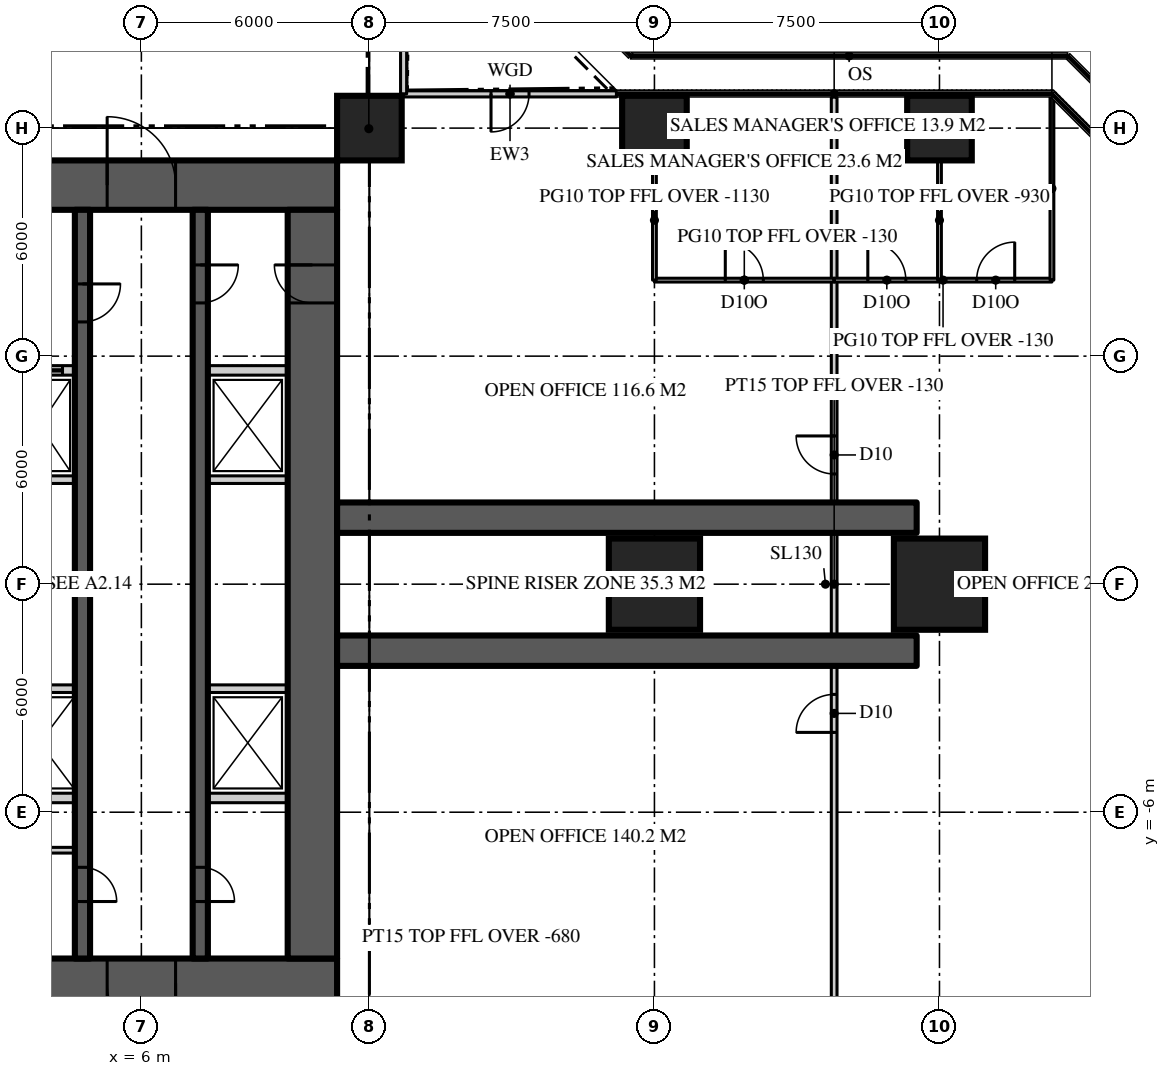
"""IFC4 building model, lengths in metres.
Left out: names, types, materials, properties, quantities, classifications, styles, units other than length and angle.
Written with IfcOpenShell. Run it as: python <this file> out.ifc"""

import sys

from ifc_helpers import new_model, si_unit, direction, frame, frame_2d, origin, origin_2d, place, context, subcontext, project, spatial, rectangle, extrude, element, fill, save


model = new_model("IFC4")
c1 = context("Model", 3, precision=1e-05, world=origin(), true_north=direction((0.0, 1.0)))
c2 = subcontext(c1, "Body", "Model", "MODEL_VIEW")
j1 = project(units=[si_unit("LENGTHUNIT", "METRE"), si_unit("PLANEANGLEUNIT", "RADIAN")], contexts=[c1])
p1 = place(None, origin())
s1 = spatial("IfcSite", under=j1, at=p1, CompositionType="ELEMENT")
p2 = place(p1, origin())
s2 = spatial("IfcBuilding", under=s1, at=p2, CompositionType="ELEMENT")
p3 = place(p2, frame((0.0, 0.0, 94.2)))
s3 = spatial("IfcBuildingStorey", under=s2, at=p3, CompositionType="ELEMENT", Elevation=94.2)
p4 = place(p3, frame((-11.15, 10.5, 0.0), z_axis=(0.0, 0.0, 1.0), x_axis=(1.0, 0.0, 0.0)))
e1 = element("IfcWall", 1, at=p4, inside=s3, PredefinedType="SHEAR", context=c2, shape_type="SweptSolid", body=[
    extrude(rectangle(XDim=22.3, YDim=1.3, at=frame_2d((11.15, 0.0))), origin(), (0.0, 0.0, 1.0), 3.9),
])
p5 = place(p4, frame((4.25, 0.0, 0.0)))
e2 = element("IfcOpeningElement", 2, at=p5, cuts=e1, PredefinedType="OPENING", context=c2, shape_type="SweptSolid", body=[
    extrude(rectangle(XDim=1.8, YDim=2.2, at=frame_2d((0.9, 1.1))), frame((0.0, 0.66, 0.0), z_axis=(0.0, -1.0, 0.0), x_axis=(1.0, 0.0, 0.0)), (0.0, 0.0, 1.0), 1.32),
])
p6 = place(p4, frame((16.25, 0.0, 0.0)))
e3 = element("IfcOpeningElement", 3, at=p6, cuts=e1, PredefinedType="OPENING", context=c2, shape_type="SweptSolid", body=[
    extrude(rectangle(XDim=1.8, YDim=2.2, at=frame_2d((0.9, 1.1))), frame((0.0, 0.66, 0.0), z_axis=(0.0, -1.0, 0.0), x_axis=(1.0, 0.0, 0.0)), (0.0, 0.0, 1.0), 1.32),
])
p7 = place(p3, frame((11.15, -10.5, 0.0), z_axis=(0.0, 0.0, 1.0), x_axis=(-1.0, 0.0, 0.0)))
e4 = element("IfcWall", 4, at=p7, inside=s3, PredefinedType="SHEAR", context=c2, shape_type="SweptSolid", body=[
    extrude(rectangle(XDim=22.3, YDim=1.3, at=frame_2d((11.15, 0.0))), origin(), (0.0, 0.0, 1.0), 3.9),
])
p8 = place(p7, frame((16.25, 0.0, 0.0)))
e5 = element("IfcOpeningElement", 5, at=p8, cuts=e4, PredefinedType="OPENING", context=c2, shape_type="SweptSolid", body=[
    extrude(rectangle(XDim=1.8, YDim=2.2, at=frame_2d((0.9, 1.1))), frame((0.0, 0.66, 0.0), z_axis=(0.0, -1.0, 0.0), x_axis=(1.0, 0.0, 0.0)), (0.0, 0.0, 1.0), 1.32),
])
p9 = place(p7, frame((4.25, 0.0, 0.0)))
e6 = element("IfcOpeningElement", 6, at=p9, cuts=e4, PredefinedType="OPENING", context=c2, shape_type="SweptSolid", body=[
    extrude(rectangle(XDim=1.8, YDim=2.2, at=frame_2d((0.9, 1.1))), frame((0.0, 0.66, 0.0), z_axis=(0.0, -1.0, 0.0), x_axis=(1.0, 0.0, 0.0)), (0.0, 0.0, 1.0), 1.32),
])
p10 = place(p3, frame((10.5, -9.85, 0.0), z_axis=(0.0, 0.0, 1.0), x_axis=(0.0, 1.0, 0.0)))
e7 = element("IfcWall", 7, at=p10, inside=s3, PredefinedType="SHEAR", context=c2, shape_type="SweptSolid", body=[
    extrude(rectangle(XDim=19.7, YDim=1.3, at=frame_2d((9.85, 0.0))), origin(), (0.0, 0.0, 1.0), 3.9),
])
p11 = place(p10, frame((17.25, 0.0, 0.0)))
e8 = element("IfcOpeningElement", 8, at=p11, cuts=e7, PredefinedType="OPENING", context=c2, shape_type="SweptSolid", body=[
    extrude(rectangle(XDim=1.0, YDim=2.2, at=frame_2d((0.5, 1.1))), frame((0.0, 0.66, 0.0), z_axis=(0.0, -1.0, 0.0), x_axis=(1.0, 0.0, 0.0)), (0.0, 0.0, 1.0), 1.32),
])
for number, where, z_axis, x_axis in (
    (9, (11.15, -1.75, 0.0), (0.0, 0.0, 1.0), (1.0, 0.0, 0.0)),
    (10, (11.15, 1.75, 0.0), (0.0, 0.0, 1.0), (1.0, 0.0, 0.0)),
):
    element("IfcWall", number, at=place(p3, frame(where, z_axis=z_axis, x_axis=x_axis)), inside=s3, PredefinedType="SHEAR", context=c2, shape_type="SweptSolid", body=[
        extrude(rectangle(XDim=15.25, YDim=0.8, at=frame_2d((7.625, 0.0))), origin(), (0.0, 0.0, 1.0), 3.9),
    ])
for number, where, z_axis, x_axis in (
    (11, (19.5, 0.0, 0.0), (0.0, 0.0, 1.0), (1.0, 0.0, 0.0)),
    (12, (27.0, 0.0, 0.0), (0.0, 0.0, 1.0), (1.0, 0.0, 0.0)),
):
    element("IfcColumn", number, at=place(p3, frame(where, z_axis=z_axis, x_axis=x_axis)), inside=s3, PredefinedType="COLUMN", context=c2, shape_type="SweptSolid", body=[
        extrude(rectangle(XDim=2.4, YDim=2.4, at=origin_2d()), origin(), (0.0, 0.0, 1.0), 3.9),
    ])
for number, where, z_axis, x_axis in (
    (13, (12.0, 12.0, 0.0), (0.0, 0.0, 1.0), (1.0, 0.0, 0.0)),
    (14, (19.5, 12.0, 0.0), (0.0, 0.0, 1.0), (1.0, 0.0, 0.0)),
    (15, (27.0, 12.0, 0.0), (0.0, 0.0, 1.0), (1.0, 0.0, 0.0)),
):
    element("IfcColumn", number, at=place(p3, frame(where, z_axis=z_axis, x_axis=x_axis)), inside=s3, PredefinedType="COLUMN", context=c2, shape_type="SweptSolid", body=[
        extrude(rectangle(XDim=1.7, YDim=1.7, at=origin_2d()), origin(), (0.0, 0.0, 1.0), 3.9),
    ])
p12 = place(p3, frame((18.5, 12.9, 0.0), z_axis=(0.0, 0.0, 1.0), x_axis=(-1.0, 0.0, 0.0)))
e16 = element("IfcWall", 16, at=p12, inside=s3, PredefinedType="SOLIDWALL", context=c2, shape_type="SweptSolid", body=[
    extrude(rectangle(XDim=5.6, YDim=0.16, at=frame_2d((2.8, 0.0))), origin(), (0.0, 0.0, 1.0), 3.77),
])
p13 = place(p12, frame((2.3, 0.0, 0.0)))
e17 = element("IfcOpeningElement", 17, at=p13, cuts=e16, PredefinedType="OPENING", context=c2, shape_type="SweptSolid", body=[
    extrude(rectangle(XDim=1.0, YDim=2.2, at=frame_2d((0.5, 1.1))), frame((0.0, 0.09, 0.0), z_axis=(0.0, -1.0, 0.0), x_axis=(1.0, 0.0, 0.0)), (0.0, 0.0, 1.0), 0.18),
])
p14 = place(p3, frame((12.9, 12.9, 0.0), z_axis=(0.0, 0.0, 1.0), x_axis=(0.0, 1.0, 0.0)))
e18 = element("IfcWall", 18, at=p14, inside=s3, PredefinedType="SOLIDWALL", context=c2, shape_type="SweptSolid", body=[
    extrude(rectangle(XDim=5.6, YDim=0.16, at=frame_2d((2.8, 0.0))), origin(), (0.0, 0.0, 1.0), 3.77),
])
p15 = place(p3, frame((7.55, 9.85, 0.0), z_axis=(0.0, 0.0, 1.0), x_axis=(0.0, -1.0, 0.0)))
e19 = element("IfcWall", 19, at=p15, inside=s3, PredefinedType="SHEAR", context=c2, shape_type="SweptSolid", body=[
    extrude(rectangle(XDim=19.7, YDim=0.4, at=frame_2d((9.85, 0.0))), origin(), (0.0, 0.0, 1.0), 3.9),
])
p16 = place(p15, frame((1.45, 0.0, 0.0)))
e20 = element("IfcOpeningElement", 20, at=p16, cuts=e19, PredefinedType="OPENING", context=c2, shape_type="SweptSolid", body=[
    extrude(rectangle(XDim=1.0, YDim=2.2, at=frame_2d((0.5, 1.1))), frame((0.0, 0.21, 0.0), z_axis=(0.0, -1.0, 0.0), x_axis=(1.0, 0.0, 0.0)), (0.0, 0.0, 1.0), 0.42),
])
p17 = place(p15, frame((17.3, 0.0, 0.0)))
e21 = element("IfcOpeningElement", 21, at=p17, cuts=e19, PredefinedType="OPENING", context=c2, shape_type="SweptSolid", body=[
    extrude(rectangle(XDim=0.9, YDim=2.1, at=frame_2d((0.45, 1.05))), frame((0.0, 0.21, 0.0), z_axis=(0.0, -1.0, 0.0), x_axis=(1.0, 0.0, 0.0)), (0.0, 0.0, 1.0), 0.42),
])
p18 = place(p3, frame((4.45, 9.85, 0.0), z_axis=(0.0, 0.0, 1.0), x_axis=(0.0, -1.0, 0.0)))
e22 = element("IfcWall", 22, at=p18, inside=s3, PredefinedType="SHEAR", context=c2, shape_type="SweptSolid", body=[
    extrude(rectangle(XDim=19.7, YDim=0.4, at=frame_2d((9.85, 0.0))), origin(), (0.0, 0.0, 1.0), 3.9),
])
p19 = place(p18, frame((1.95, 0.0, 0.0)))
e23 = element("IfcOpeningElement", 23, at=p19, cuts=e22, PredefinedType="OPENING", context=c2, shape_type="SweptSolid", body=[
    extrude(rectangle(XDim=1.0, YDim=2.2, at=frame_2d((0.5, 1.1))), frame((0.0, 0.21, 0.0), z_axis=(0.0, -1.0, 0.0), x_axis=(1.0, 0.0, 0.0)), (0.0, 0.0, 1.0), 0.42),
])
p20 = place(p18, frame((17.3, 0.0, 0.0)))
e24 = element("IfcOpeningElement", 24, at=p20, cuts=e22, PredefinedType="OPENING", context=c2, shape_type="SweptSolid", body=[
    extrude(rectangle(XDim=0.9, YDim=2.1, at=frame_2d((0.45, 1.05))), frame((0.0, 0.21, 0.0), z_axis=(0.0, -1.0, 0.0), x_axis=(1.0, 0.0, 0.0)), (0.0, 0.0, 1.0), 0.42),
])
p21 = place(p3, frame((2.4, 5.625, 0.0), z_axis=(0.0, 0.0, 1.0), x_axis=(1.0, 0.0, 0.0)))
e25 = element("IfcWall", 25, at=p21, inside=s3, PredefinedType="SOLIDWALL", context=c2, shape_type="SweptSolid", body=[
    extrude(rectangle(XDim=1.85, YDim=0.25, at=frame_2d((0.925, 0.0))), origin(), (0.0, 0.0, 1.0), 3.7),
])
p22 = place(p21, frame((0.325, 0.0, 0.0)))
e26 = element("IfcOpeningElement", 26, at=p22, cuts=e25, PredefinedType="OPENING", context=c2, shape_type="SweptSolid", body=[
    extrude(rectangle(XDim=1.2, YDim=2.2, at=frame_2d((0.6, 1.1))), frame((0.0, 0.135, 0.0), z_axis=(0.0, -1.0, 0.0), x_axis=(1.0, 0.0, 0.0)), (0.0, 0.0, 1.0), 0.27),
])
p23 = place(p3, frame((7.75, 5.625, 0.0), z_axis=(0.0, 0.0, 1.0), x_axis=(1.0, 0.0, 0.0)))
e27 = element("IfcWall", 27, at=p23, inside=s3, PredefinedType="SOLIDWALL", context=c2, shape_type="SweptSolid", body=[
    extrude(rectangle(XDim=2.1, YDim=0.25, at=frame_2d((1.05, 0.0))), origin(), (0.0, 0.0, 1.0), 3.7),
])
p24 = place(p3, frame((2.4, -5.625, 0.0), z_axis=(0.0, 0.0, 1.0), x_axis=(1.0, 0.0, 0.0)))
e28 = element("IfcWall", 28, at=p24, inside=s3, PredefinedType="SOLIDWALL", context=c2, shape_type="SweptSolid", body=[
    extrude(rectangle(XDim=1.85, YDim=0.25, at=frame_2d((0.925, 0.0))), origin(), (0.0, 0.0, 1.0), 3.7),
])
p25 = place(p3, frame((7.75, -5.625, 0.0), z_axis=(0.0, 0.0, 1.0), x_axis=(1.0, 0.0, 0.0)))
e29 = element("IfcWall", 29, at=p25, inside=s3, PredefinedType="SOLIDWALL", context=c2, shape_type="SweptSolid", body=[
    extrude(rectangle(XDim=2.1, YDim=0.25, at=frame_2d((1.05, 0.0))), origin(), (0.0, 0.0, 1.0), 3.7),
])
p26 = place(p3, frame((2.4, -2.75, 0.0), z_axis=(0.0, 0.0, 1.0), x_axis=(1.0, 0.0, 0.0)))
e30 = element("IfcWall", 30, at=p26, inside=s3, PredefinedType="SOLIDWALL", context=c2, shape_type="SweptSolid", body=[
    extrude(rectangle(XDim=1.85, YDim=0.2, at=frame_2d((0.925, 0.0))), origin(), (0.0, 0.0, 1.0), 3.7),
])
p27 = place(p3, frame((7.75, -2.75, 0.0), z_axis=(0.0, 0.0, 1.0), x_axis=(1.0, 0.0, 0.0)))
e31 = element("IfcWall", 31, at=p27, inside=s3, PredefinedType="SOLIDWALL", context=c2, shape_type="SweptSolid", body=[
    extrude(rectangle(XDim=2.1, YDim=0.2, at=frame_2d((1.05, 0.0))), origin(), (0.0, 0.0, 1.0), 3.7),
])
p28 = place(p3, frame((2.4, 2.75, 0.0), z_axis=(0.0, 0.0, 1.0), x_axis=(1.0, 0.0, 0.0)))
e32 = element("IfcWall", 32, at=p28, inside=s3, PredefinedType="SOLIDWALL", context=c2, shape_type="SweptSolid", body=[
    extrude(rectangle(XDim=1.85, YDim=0.2, at=frame_2d((0.925, 0.0))), origin(), (0.0, 0.0, 1.0), 3.7),
])
p29 = place(p3, frame((7.75, 2.75, 0.0), z_axis=(0.0, 0.0, 1.0), x_axis=(1.0, 0.0, 0.0)))
e33 = element("IfcWall", 33, at=p29, inside=s3, PredefinedType="SOLIDWALL", context=c2, shape_type="SweptSolid", body=[
    extrude(rectangle(XDim=2.1, YDim=0.2, at=frame_2d((1.05, 0.0))), origin(), (0.0, 0.0, 1.0), 3.7),
])
p30 = place(p3, frame((24.229, -12.82, 0.0), z_axis=(0.0, 0.0, 1.0), x_axis=(0.0, 1.0, 0.0)))
e34 = element("IfcWall", 34, at=p30, inside=s3, PredefinedType="PARTITIONING", context=c2, shape_type="SweptSolid", body=[
    extrude(rectangle(XDim=25.64, YDim=0.15, at=frame_2d((12.82, 0.0))), origin(), (0.0, 0.0, 1.0), 3.77),
])
p31 = place(p30, frame((15.72, 0.0, 0.0)))
e35 = element("IfcOpeningElement", 35, at=p31, cuts=e34, PredefinedType="OPENING", context=c2, shape_type="SweptSolid", body=[
    extrude(rectangle(XDim=1.0, YDim=2.2, at=frame_2d((0.5, 1.1))), frame((0.0, 0.085, 0.0), z_axis=(0.0, -1.0, 0.0), x_axis=(1.0, 0.0, 0.0)), (0.0, 0.0, 1.0), 0.17),
])
p32 = place(p30, frame((8.92, 0.0, 0.0)))
e36 = element("IfcOpeningElement", 36, at=p32, cuts=e34, PredefinedType="OPENING", context=c2, shape_type="SweptSolid", body=[
    extrude(rectangle(XDim=1.0, YDim=2.2, at=frame_2d((0.5, 1.1))), frame((0.0, 0.085, 0.0), z_axis=(0.0, -1.0, 0.0), x_axis=(1.0, 0.0, 0.0)), (0.0, 0.0, 1.0), 0.17),
])
p33 = place(p3, frame((19.5, 8.0, 0.0), z_axis=(0.0, 0.0, 1.0), x_axis=(1.0, 0.0, 0.0)))
e37 = element("IfcWall", 37, at=p33, inside=s3, PredefinedType="PARTITIONING", context=c2, shape_type="SweptSolid", body=[
    extrude(rectangle(XDim=4.729, YDim=0.1, at=frame_2d((2.365, 0.0))), origin(), (0.0, 0.0, 1.0), 3.77),
])
p34 = place(p33, frame((1.865, 0.0, 0.0)))
e38 = element("IfcOpeningElement", 38, at=p34, cuts=e37, PredefinedType="OPENING", context=c2, shape_type="SweptSolid", body=[
    extrude(rectangle(XDim=1.0, YDim=2.2, at=frame_2d((0.5, 1.1))), frame((0.0, 0.06, 0.0), z_axis=(0.0, -1.0, 0.0), x_axis=(1.0, 0.0, 0.0)), (0.0, 0.0, 1.0), 0.12),
])
p35 = place(p3, frame((24.229, 8.0, 0.0), z_axis=(0.0, 0.0, 1.0), x_axis=(1.0, 0.0, 0.0)))
e39 = element("IfcWall", 39, at=p35, inside=s3, PredefinedType="PARTITIONING", context=c2, shape_type="SweptSolid", body=[
    extrude(rectangle(XDim=5.73, YDim=0.1, at=frame_2d((2.865, 0.0))), origin(), (0.0, 0.0, 1.0), 3.77),
])
p36 = place(p35, frame((0.885, 0.0, 0.0)))
e40 = element("IfcOpeningElement", 40, at=p36, cuts=e39, PredefinedType="OPENING", context=c2, shape_type="SweptSolid", body=[
    extrude(rectangle(XDim=1.0, YDim=2.2, at=frame_2d((0.5, 1.1))), frame((0.0, 0.06, 0.0), z_axis=(0.0, -1.0, 0.0), x_axis=(1.0, 0.0, 0.0)), (0.0, 0.0, 1.0), 0.12),
])
p37 = place(p35, frame((3.75, 0.0, 0.0)))
e41 = element("IfcOpeningElement", 41, at=p37, cuts=e39, PredefinedType="OPENING", context=c2, shape_type="SweptSolid", body=[
    extrude(rectangle(XDim=1.0, YDim=2.2, at=frame_2d((0.5, 1.1))), frame((0.0, 0.06, 0.0), z_axis=(0.0, -1.0, 0.0), x_axis=(1.0, 0.0, 0.0)), (0.0, 0.0, 1.0), 0.12),
])
p38 = place(p3, frame((19.5, 8.0, 0.0), z_axis=(0.0, 0.0, 1.0), x_axis=(0.0, 1.0, 0.0)))
e42 = element("IfcWall", 42, at=p38, inside=s3, PredefinedType="PARTITIONING", context=c2, shape_type="SweptSolid", body=[
    extrude(rectangle(XDim=3.15, YDim=0.1, at=frame_2d((1.575, 0.0))), origin(), (0.0, 0.0, 1.0), 2.77),
])
p39 = place(p3, frame((27.0, 8.0, 0.0), z_axis=(0.0, 0.0, 1.0), x_axis=(0.0, 1.0, 0.0)))
e43 = element("IfcWall", 43, at=p39, inside=s3, PredefinedType="PARTITIONING", context=c2, shape_type="SweptSolid", body=[
    extrude(rectangle(XDim=3.15, YDim=0.1, at=frame_2d((1.575, 0.0))), origin(), (0.0, 0.0, 1.0), 2.97),
])
p40 = place(p3, frame((29.959, 8.0, 0.0), z_axis=(0.0, 0.0, 1.0), x_axis=(0.0, 1.0, 0.0)))
e44 = element("IfcWall", 44, at=p40, inside=s3, PredefinedType="PARTITIONING", context=c2, shape_type="SweptSolid", body=[
    extrude(rectangle(XDim=4.82, YDim=0.1, at=frame_2d((2.41, 0.0))), origin(), (0.0, 0.0, 1.0), 3.77),
])
p41 = place(p3, frame((11.15, 11.15, 0.0), z_axis=(0.0, 0.0, 1.0), x_axis=(0.707106781187, 0.707106781187, 0.0)))
e45 = element("IfcWall", 45, at=p41, inside=s3, PredefinedType="PARTITIONING", context=c2, shape_type="SweptSolid", body=[
    extrude(rectangle(XDim=2.362, YDim=0.15, at=frame_2d((1.181, 0.0))), origin(), (0.0, 0.0, 1.0), 3.22),
])
p42 = place(p3, frame((2.4, -7.0, 0.0), z_axis=(0.0, 0.0, 1.0), x_axis=(1.0, 0.0, 0.0)))
e46 = element("IfcWall", 46, at=p42, inside=s3, PredefinedType="SOLIDWALL", context=c2, shape_type="SweptSolid", body=[
    extrude(rectangle(XDim=1.85, YDim=0.15, at=frame_2d((0.925, 0.0))), origin(), (0.0, 0.0, 1.0), 3.77),
])
p43 = place(p42, frame((0.1, 0.0, 0.0)))
e47 = element("IfcOpeningElement", 47, at=p43, cuts=e46, PredefinedType="OPENING", context=c2, shape_type="SweptSolid", body=[
    extrude(rectangle(XDim=0.9, YDim=2.1, at=frame_2d((0.45, 1.05))), frame((0.0, 0.085, 0.0), z_axis=(0.0, -1.0, 0.0), x_axis=(1.0, 0.0, 0.0)), (0.0, 0.0, 1.0), 0.17),
])
p44 = place(p13, origin())
e48 = element("IfcDoor", 48, at=p44, inside=s3, OperationType="SINGLE_SWING_RIGHT", PredefinedType="DOOR", context=c2, shape_type="SweptSolid", body=[
    extrude(rectangle(XDim=1.0, YDim=2.2, at=frame_2d((0.5, 1.1))), frame((0.0, 0.025, 0.0), z_axis=(0.0, -1.0, 0.0), x_axis=(1.0, 0.0, 0.0)), (0.0, 0.0, 1.0), 0.05),
])
fill(e17, e48)
p45 = place(p6, origin())
e49 = element("IfcDoor", 49, at=p45, inside=s3, OperationType="DOUBLE_DOOR_DOUBLE_SWING", PredefinedType="DOOR", context=c2, shape_type="SweptSolid", body=[
    extrude(rectangle(XDim=1.8, YDim=2.2, at=frame_2d((0.9, 1.1))), frame((0.0, 0.025, 0.0), z_axis=(0.0, -1.0, 0.0), x_axis=(1.0, 0.0, 0.0)), (0.0, 0.0, 1.0), 0.05),
])
fill(e3, e49)
p46 = place(p9, origin())
e50 = element("IfcDoor", 50, at=p46, inside=s3, OperationType="DOUBLE_DOOR_DOUBLE_SWING", PredefinedType="DOOR", context=c2, shape_type="SweptSolid", body=[
    extrude(rectangle(XDim=1.8, YDim=2.2, at=frame_2d((0.9, 1.1))), frame((0.0, 0.025, 0.0), z_axis=(0.0, -1.0, 0.0), x_axis=(1.0, 0.0, 0.0)), (0.0, 0.0, 1.0), 0.05),
])
fill(e6, e50)
p47 = place(p16, origin())
e51 = element("IfcDoor", 51, at=p47, inside=s3, OperationType="SINGLE_SWING_LEFT", PredefinedType="DOOR", context=c2, shape_type="SweptSolid", body=[
    extrude(rectangle(XDim=1.0, YDim=2.2, at=frame_2d((0.5, 1.1))), frame((0.0, 0.025, 0.0), z_axis=(0.0, -1.0, 0.0), x_axis=(1.0, 0.0, 0.0)), (0.0, 0.0, 1.0), 0.05),
])
fill(e20, e51)
p48 = place(p11, origin())
e52 = element("IfcDoor", 52, at=p48, inside=s3, OperationType="SINGLE_SWING_RIGHT", PredefinedType="DOOR", context=c2, shape_type="SweptSolid", body=[
    extrude(rectangle(XDim=1.0, YDim=2.2, at=frame_2d((0.5, 1.1))), frame((0.0, 0.025, 0.0), z_axis=(0.0, -1.0, 0.0), x_axis=(1.0, 0.0, 0.0)), (0.0, 0.0, 1.0), 0.05),
])
fill(e8, e52)
p49 = place(p19, origin())
e53 = element("IfcDoor", 53, at=p49, inside=s3, OperationType="SINGLE_SWING_LEFT", PredefinedType="DOOR", context=c2, shape_type="SweptSolid", body=[
    extrude(rectangle(XDim=1.0, YDim=2.2, at=frame_2d((0.5, 1.1))), frame((0.0, 0.025, 0.0), z_axis=(0.0, -1.0, 0.0), x_axis=(1.0, 0.0, 0.0)), (0.0, 0.0, 1.0), 0.05),
])
fill(e23, e53)
p50 = place(p17, origin())
e54 = element("IfcDoor", 54, at=p50, inside=s3, OperationType="SINGLE_SWING_RIGHT", PredefinedType="DOOR", context=c2, shape_type="SweptSolid", body=[
    extrude(rectangle(XDim=0.9, YDim=2.1, at=frame_2d((0.45, 1.05))), frame((0.0, 0.025, 0.0), z_axis=(0.0, -1.0, 0.0), x_axis=(1.0, 0.0, 0.0)), (0.0, 0.0, 1.0), 0.05),
])
fill(e21, e54)
p51 = place(p20, origin())
e55 = element("IfcDoor", 55, at=p51, inside=s3, OperationType="SINGLE_SWING_RIGHT", PredefinedType="DOOR", context=c2, shape_type="SweptSolid", body=[
    extrude(rectangle(XDim=0.9, YDim=2.1, at=frame_2d((0.45, 1.05))), frame((0.0, 0.025, 0.0), z_axis=(0.0, -1.0, 0.0), x_axis=(1.0, 0.0, 0.0)), (0.0, 0.0, 1.0), 0.05),
])
fill(e24, e55)
p52 = place(p22, origin())
e56 = element("IfcDoor", 56, at=p52, inside=s3, OperationType="SLIDING_TO_LEFT", PredefinedType="DOOR", context=c2, shape_type="SweptSolid", body=[
    extrude(rectangle(XDim=1.2, YDim=2.2, at=frame_2d((0.6, 1.1))), frame((0.0, 0.025, 0.0), z_axis=(0.0, -1.0, 0.0), x_axis=(1.0, 0.0, 0.0)), (0.0, 0.0, 1.0), 0.05),
])
fill(e26, e56)
p53 = place(p31, origin())
e57 = element("IfcDoor", 57, at=p53, inside=s3, OperationType="SINGLE_SWING_RIGHT", PredefinedType="DOOR", context=c2, shape_type="SweptSolid", body=[
    extrude(rectangle(XDim=1.0, YDim=2.2, at=frame_2d((0.5, 1.1))), frame((0.0, 0.025, 0.0), z_axis=(0.0, -1.0, 0.0), x_axis=(1.0, 0.0, 0.0)), (0.0, 0.0, 1.0), 0.05),
])
fill(e35, e57)
p54 = place(p32, origin())
e58 = element("IfcDoor", 58, at=p54, inside=s3, OperationType="SINGLE_SWING_LEFT", PredefinedType="DOOR", context=c2, shape_type="SweptSolid", body=[
    extrude(rectangle(XDim=1.0, YDim=2.2, at=frame_2d((0.5, 1.1))), frame((0.0, 0.025, 0.0), z_axis=(0.0, -1.0, 0.0), x_axis=(1.0, 0.0, 0.0)), (0.0, 0.0, 1.0), 0.05),
])
fill(e36, e58)
p55 = place(p34, origin())
e59 = element("IfcDoor", 59, at=p55, inside=s3, OperationType="SINGLE_SWING_LEFT", PredefinedType="DOOR", context=c2, shape_type="SweptSolid", body=[
    extrude(rectangle(XDim=1.0, YDim=2.2, at=frame_2d((0.5, 1.1))), frame((0.0, 0.025, 0.0), z_axis=(0.0, -1.0, 0.0), x_axis=(1.0, 0.0, 0.0)), (0.0, 0.0, 1.0), 0.05),
])
fill(e38, e59)
p56 = place(p36, origin())
e60 = element("IfcDoor", 60, at=p56, inside=s3, OperationType="SINGLE_SWING_LEFT", PredefinedType="DOOR", context=c2, shape_type="SweptSolid", body=[
    extrude(rectangle(XDim=1.0, YDim=2.2, at=frame_2d((0.5, 1.1))), frame((0.0, 0.025, 0.0), z_axis=(0.0, -1.0, 0.0), x_axis=(1.0, 0.0, 0.0)), (0.0, 0.0, 1.0), 0.05),
])
fill(e40, e60)
p57 = place(p37, origin())
e61 = element("IfcDoor", 61, at=p57, inside=s3, OperationType="SINGLE_SWING_RIGHT", PredefinedType="DOOR", context=c2, shape_type="SweptSolid", body=[
    extrude(rectangle(XDim=1.0, YDim=2.2, at=frame_2d((0.5, 1.1))), frame((0.0, 0.025, 0.0), z_axis=(0.0, -1.0, 0.0), x_axis=(1.0, 0.0, 0.0)), (0.0, 0.0, 1.0), 0.05),
])
fill(e41, e61)
save(model, sys.argv[1])
